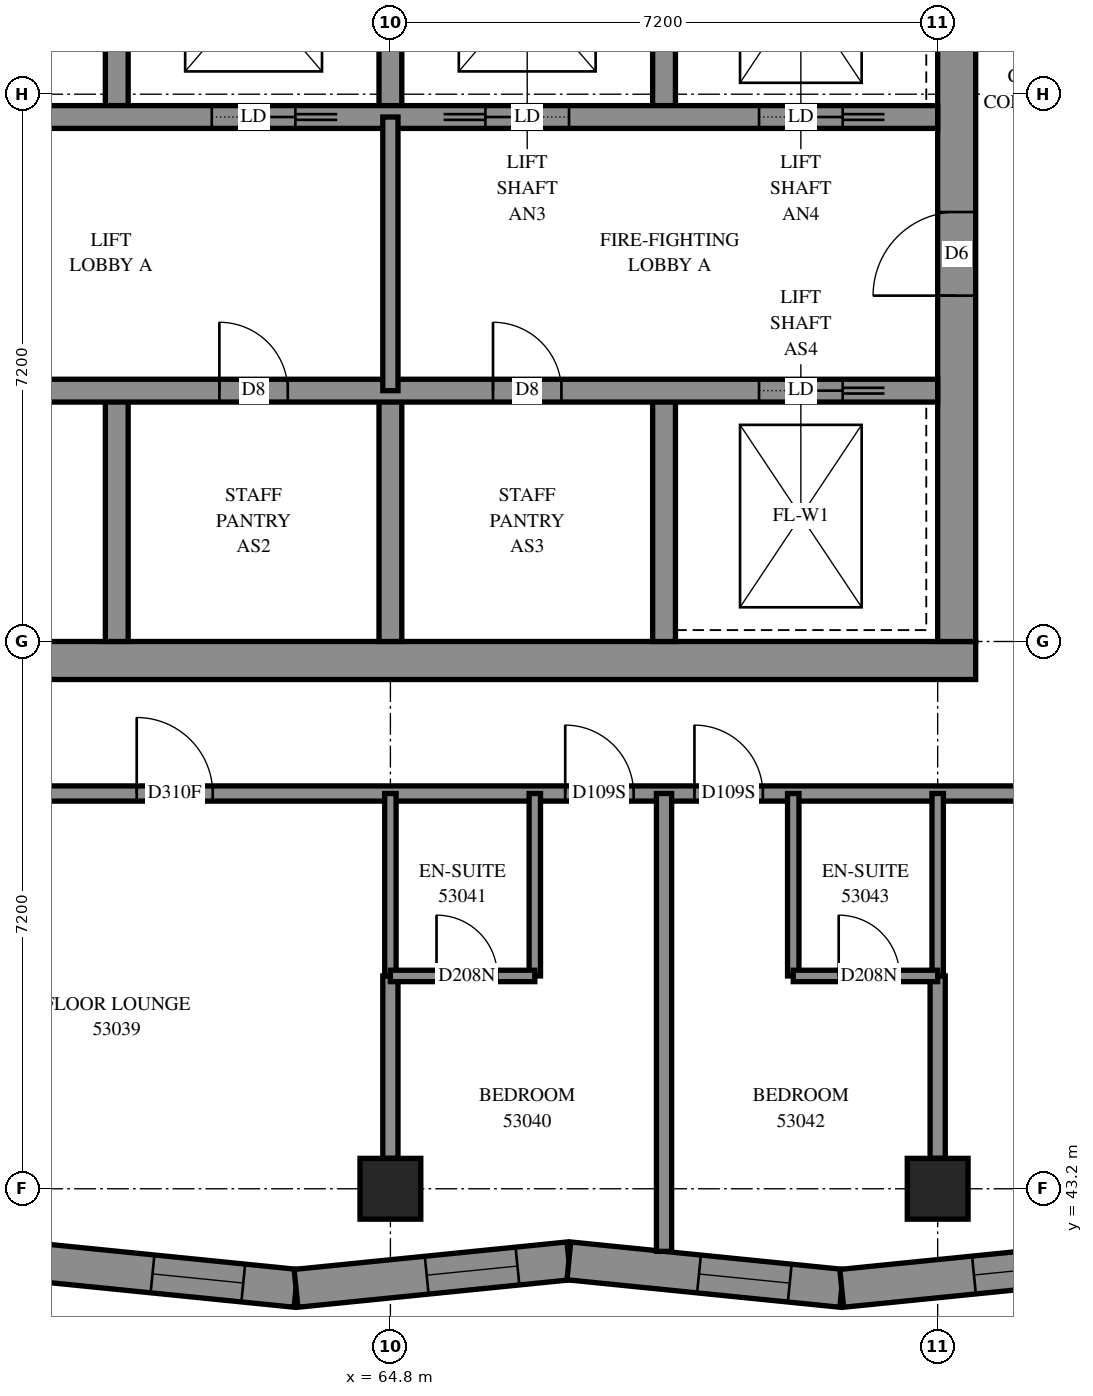
"""IFC4 building model, lengths in metres.
Left out: names, types, materials, properties, quantities, classifications, styles, units other than length and angle.
Written with IfcOpenShell. Run it as: python <this file> out.ifc"""

import sys

from ifc_helpers import new_model, si_unit, direction, frame, frame_2d, origin, origin_2d, place, context, subcontext, project, spatial, polyline, rectangle, outline, extrude, element, fill, save


model = new_model("IFC4")
c1 = context("Model", 3, precision=1e-05, world=origin(), true_north=direction((0.0, 1.0)))
c2 = subcontext(c1, "Body", "Model", "MODEL_VIEW")
j1 = project(units=[si_unit("LENGTHUNIT", "METRE"), si_unit("PLANEANGLEUNIT", "RADIAN")], contexts=[c1])
p1 = place(None, origin())
s1 = spatial("IfcSite", under=j1, at=p1, CompositionType="ELEMENT")
p2 = place(p1, origin())
s2 = spatial("IfcBuilding", under=s1, at=p2, CompositionType="ELEMENT")
p3 = place(p2, frame((0.0, 0.0, 196.4)))
s3 = spatial("IfcBuildingStorey", under=s2, at=p3, CompositionType="ELEMENT", Elevation=196.4)
for number, where, z_axis, x_axis in (
    (1, (64.8, 43.2, 0.0), (0.0, 0.0, 1.0), (1.0, 0.0, 0.0)),
    (2, (72.0, 43.2, 0.0), (0.0, 0.0, 1.0), (1.0, 0.0, 0.0)),
):
    element("IfcColumn", number, at=place(p3, frame(where, z_axis=z_axis, x_axis=x_axis)), inside=s3, PredefinedType="COLUMN", context=c2, shape_type="SweptSolid", body=[
        extrude(rectangle(XDim=0.8, YDim=0.8, at=origin_2d()), origin(), (0.0, 0.0, 1.0), 3.1),
    ])
p4 = place(p3, frame((57.1, 50.15, -0.3), z_axis=(0.0, 0.0, 1.0), x_axis=(1.0, 0.0, 0.0)))
e3 = element("IfcWall", 3, at=p4, inside=s3, PredefinedType="SHEAR", context=c2, shape_type="SweptSolid", body=[
    extrude(rectangle(XDim=15.4, YDim=0.5, at=frame_2d((7.7, 0.0))), origin(), (0.0, 0.0, 1.0), 2.7),
])
p5 = place(p3, frame((72.25, 50.4, -0.3), z_axis=(0.0, 0.0, 1.0), x_axis=(0.0, 1.0, 0.0)))
e4 = element("IfcWall", 4, at=p5, inside=s3, PredefinedType="SHEAR", context=c2, shape_type="SweptSolid", body=[
    extrude(rectangle(XDim=14.4, YDim=0.5, at=frame_2d((7.2, 0.0))), origin(), (0.0, 0.0, 1.0), 2.7),
])
p6 = place(p5, frame((4.55, 0.0, 0.3)))
e5 = element("IfcOpeningElement", 5, at=p6, cuts=e4, PredefinedType="OPENING", context=c2, shape_type="SweptSolid", body=[
    extrude(rectangle(XDim=1.1, YDim=2.1, at=frame_2d((0.55, 1.05))), frame((0.0, 0.26, 0.0), z_axis=(0.0, -1.0, 0.0), x_axis=(1.0, 0.0, 0.0)), (0.0, 0.0, 1.0), 0.52),
])
p7 = place(p5, frame((11.35, 0.0, 0.3)))
e6 = element("IfcOpeningElement", 6, at=p7, cuts=e4, PredefinedType="OPENING", context=c2, shape_type="SweptSolid", body=[
    extrude(rectangle(XDim=1.1, YDim=2.1, at=frame_2d((0.55, 1.05))), frame((0.0, 0.26, 0.0), z_axis=(0.0, -1.0, 0.0), x_axis=(1.0, 0.0, 0.0)), (0.0, 0.0, 1.0), 0.52),
])
for number, where, z_axis, x_axis in (
    (7, (61.2, 50.4, 0.0), (0.0, 0.0, 1.0), (0.0, 1.0, 0.0)),
    (8, (61.2, 57.3, 0.0), (0.0, 0.0, 1.0), (0.0, 1.0, 0.0)),
    (9, (64.8, 50.4, 0.0), (0.0, 0.0, 1.0), (0.0, 1.0, 0.0)),
    (10, (64.8, 57.3, 0.0), (0.0, 0.0, 1.0), (0.0, 1.0, 0.0)),
    (11, (68.4, 50.4, 0.0), (0.0, 0.0, 1.0), (0.0, 1.0, 0.0)),
    (12, (68.4, 57.3, 0.0), (0.0, 0.0, 1.0), (0.0, 1.0, 0.0)),
):
    element("IfcWall", number, at=place(p3, frame(where, z_axis=z_axis, x_axis=x_axis)), inside=s3, PredefinedType="SOLIDWALL", context=c2, shape_type="SweptSolid", body=[
        extrude(rectangle(XDim=3.3, YDim=0.3, at=frame_2d((1.65, 0.0))), origin(), (0.0, 0.0, 1.0), 3.1),
    ])
p8 = place(p3, frame((57.6, 53.7, 0.0), z_axis=(0.0, 0.0, 1.0), x_axis=(1.0, 0.0, 0.0)))
e13 = element("IfcWall", 13, at=p8, inside=s3, PredefinedType="SOLIDWALL", context=c2, shape_type="SweptSolid", body=[
    extrude(rectangle(XDim=14.4, YDim=0.3, at=frame_2d((7.2, 0.0))), origin(), (0.0, 0.0, 1.0), 3.1),
])
p9 = place(p8, frame((1.35, 0.0, 0.0)))
e14 = element("IfcOpeningElement", 14, at=p9, cuts=e13, PredefinedType="OPENING", context=c2, shape_type="SweptSolid", body=[
    extrude(rectangle(XDim=0.9, YDim=2.1, at=frame_2d((0.45, 1.05))), frame((0.0, 0.16, 0.0), z_axis=(0.0, -1.0, 0.0), x_axis=(1.0, 0.0, 0.0)), (0.0, 0.0, 1.0), 0.32),
])
p10 = place(p8, frame((4.95, 0.0, 0.0)))
e15 = element("IfcOpeningElement", 15, at=p10, cuts=e13, PredefinedType="OPENING", context=c2, shape_type="SweptSolid", body=[
    extrude(rectangle(XDim=0.9, YDim=2.1, at=frame_2d((0.45, 1.05))), frame((0.0, 0.16, 0.0), z_axis=(0.0, -1.0, 0.0), x_axis=(1.0, 0.0, 0.0)), (0.0, 0.0, 1.0), 0.32),
])
p11 = place(p8, frame((8.55, 0.0, 0.0)))
e16 = element("IfcOpeningElement", 16, at=p11, cuts=e13, PredefinedType="OPENING", context=c2, shape_type="SweptSolid", body=[
    extrude(rectangle(XDim=0.9, YDim=2.1, at=frame_2d((0.45, 1.05))), frame((0.0, 0.16, 0.0), z_axis=(0.0, -1.0, 0.0), x_axis=(1.0, 0.0, 0.0)), (0.0, 0.0, 1.0), 0.32),
])
p12 = place(p8, frame((12.05, 0.0, 0.0)))
e17 = element("IfcOpeningElement", 17, at=p12, cuts=e13, PredefinedType="OPENING", context=c2, shape_type="SweptSolid", body=[
    extrude(rectangle(XDim=1.1, YDim=2.1, at=frame_2d((0.55, 1.05))), frame((0.0, 0.16, 0.0), z_axis=(0.0, -1.0, 0.0), x_axis=(1.0, 0.0, 0.0)), (0.0, 0.0, 1.0), 0.32),
])
p13 = place(p3, frame((57.6, 57.3, 0.0), z_axis=(0.0, 0.0, 1.0), x_axis=(1.0, 0.0, 0.0)))
e18 = element("IfcWall", 18, at=p13, inside=s3, PredefinedType="SOLIDWALL", context=c2, shape_type="SweptSolid", body=[
    extrude(rectangle(XDim=14.4, YDim=0.3, at=frame_2d((7.2, 0.0))), origin(), (0.0, 0.0, 1.0), 3.1),
])
p14 = place(p13, frame((1.25, 0.0, 0.0)))
e19 = element("IfcOpeningElement", 19, at=p14, cuts=e18, PredefinedType="OPENING", context=c2, shape_type="SweptSolid", body=[
    extrude(rectangle(XDim=1.1, YDim=2.1, at=frame_2d((0.55, 1.05))), frame((0.0, 0.16, 0.0), z_axis=(0.0, -1.0, 0.0), x_axis=(1.0, 0.0, 0.0)), (0.0, 0.0, 1.0), 0.32),
])
p15 = place(p13, frame((4.85, 0.0, 0.0)))
e20 = element("IfcOpeningElement", 20, at=p15, cuts=e18, PredefinedType="OPENING", context=c2, shape_type="SweptSolid", body=[
    extrude(rectangle(XDim=1.1, YDim=2.1, at=frame_2d((0.55, 1.05))), frame((0.0, 0.16, 0.0), z_axis=(0.0, -1.0, 0.0), x_axis=(1.0, 0.0, 0.0)), (0.0, 0.0, 1.0), 0.32),
])
p16 = place(p13, frame((8.45, 0.0, 0.0)))
e21 = element("IfcOpeningElement", 21, at=p16, cuts=e18, PredefinedType="OPENING", context=c2, shape_type="SweptSolid", body=[
    extrude(rectangle(XDim=1.1, YDim=2.1, at=frame_2d((0.55, 1.05))), frame((0.0, 0.16, 0.0), z_axis=(0.0, -1.0, 0.0), x_axis=(1.0, 0.0, 0.0)), (0.0, 0.0, 1.0), 0.32),
])
p17 = place(p13, frame((12.05, 0.0, 0.0)))
e22 = element("IfcOpeningElement", 22, at=p17, cuts=e18, PredefinedType="OPENING", context=c2, shape_type="SweptSolid", body=[
    extrude(rectangle(XDim=1.1, YDim=2.1, at=frame_2d((0.55, 1.05))), frame((0.0, 0.16, 0.0), z_axis=(0.0, -1.0, 0.0), x_axis=(1.0, 0.0, 0.0)), (0.0, 0.0, 1.0), 0.32),
])
p18 = place(p3, frame((59.969, 42.251, 0.0), z_axis=(0.0, 0.0, 1.0), x_axis=(0.9949813245, -0.1000608012, 0.0)))
e23 = element("IfcWall", 23, at=p18, inside=s3, PredefinedType="SOLIDWALL", context=c2, shape_type="SweptSolid", body=[
    extrude(outline(polyline([(0.025, -0.25), (3.633, -0.25), (3.583, 0.25), (-0.025, 0.25), (0.025, -0.25)])), origin(), (0.0, 0.0, 1.0), 3.1),
])
p19 = place(p18, frame((1.71, 0.0, 0.45)))
e24 = element("IfcOpeningElement", 24, at=p19, cuts=e23, PredefinedType="OPENING", context=c2, shape_type="SweptSolid", body=[
    extrude(rectangle(XDim=1.2, YDim=2.5, at=frame_2d((0.6, 1.25))), frame((0.0, 0.26, 0.0), z_axis=(0.0, -1.0, 0.0), x_axis=(1.0, 0.0, 0.0)), (0.0, 0.0, 1.0), 0.52),
])
p20 = place(p3, frame((63.559, 41.89, 0.0), z_axis=(0.0, 0.0, 1.0), x_axis=(0.994981047, 0.1000635608, 0.0)))
e25 = element("IfcWall", 25, at=p20, inside=s3, PredefinedType="SOLIDWALL", context=c2, shape_type="SweptSolid", body=[
    extrude(outline(polyline([(-0.025, -0.25), (3.583, -0.25), (3.633, 0.25), (0.025, 0.25), (-0.025, -0.25)])), origin(), (0.0, 0.0, 1.0), 3.1),
])
p21 = place(p20, frame((1.728, 0.0, 0.45)))
e26 = element("IfcOpeningElement", 26, at=p21, cuts=e25, PredefinedType="OPENING", context=c2, shape_type="SweptSolid", body=[
    extrude(rectangle(XDim=1.2, YDim=2.5, at=frame_2d((0.6, 1.25))), frame((0.0, 0.26, 0.0), z_axis=(0.0, -1.0, 0.0), x_axis=(1.0, 0.0, 0.0)), (0.0, 0.0, 1.0), 0.52),
])
p22 = place(p3, frame((67.148, 42.251, 0.0), z_axis=(0.0, 0.0, 1.0), x_axis=(0.994981047, -0.1000635608, 0.0)))
e27 = element("IfcWall", 27, at=p22, inside=s3, PredefinedType="SOLIDWALL", context=c2, shape_type="SweptSolid", body=[
    extrude(outline(polyline([(0.025, -0.25), (3.633, -0.25), (3.583, 0.25), (-0.025, 0.25), (0.025, -0.25)])), origin(), (0.0, 0.0, 1.0), 3.1),
])
p23 = place(p22, frame((1.72, 0.0, 0.45)))
e28 = element("IfcOpeningElement", 28, at=p23, cuts=e27, PredefinedType="OPENING", context=c2, shape_type="SweptSolid", body=[
    extrude(rectangle(XDim=1.2, YDim=2.5, at=frame_2d((0.6, 1.25))), frame((0.0, 0.26, 0.0), z_axis=(0.0, -1.0, 0.0), x_axis=(1.0, 0.0, 0.0)), (0.0, 0.0, 1.0), 0.52),
])
p24 = place(p3, frame((70.738, 41.89, 0.0), z_axis=(0.0, 0.0, 1.0), x_axis=(0.9949827385, 0.1000467394, 0.0)))
e29 = element("IfcWall", 29, at=p24, inside=s3, PredefinedType="SOLIDWALL", context=c2, shape_type="SweptSolid", body=[
    extrude(outline(polyline([(-0.025, -0.25), (3.583, -0.25), (3.674, 0.25), (0.025, 0.25), (-0.025, -0.25)])), origin(), (0.0, 0.0, 1.0), 3.1),
])
p25 = place(p24, frame((1.748, 0.0, 0.45)))
e30 = element("IfcOpeningElement", 30, at=p25, cuts=e29, PredefinedType="OPENING", context=c2, shape_type="SweptSolid", body=[
    extrude(rectangle(XDim=1.2, YDim=2.5, at=frame_2d((0.6, 1.25))), frame((0.0, 0.26, 0.0), z_axis=(0.0, -1.0, 0.0), x_axis=(1.0, 0.0, 0.0)), (0.0, 0.0, 1.0), 0.52),
])
p26 = place(p3, frame((64.8, 53.7, 0.0), z_axis=(0.0, 0.0, 1.0), x_axis=(0.0, 1.0, 0.0)))
e31 = element("IfcWall", 31, at=p26, inside=s3, PredefinedType="PARTITIONING", context=c2, shape_type="SweptSolid", body=[
    extrude(rectangle(XDim=3.6, YDim=0.2, at=frame_2d((1.8, 0.0))), origin(), (0.0, 0.0, 1.0), 3.1),
])
p27 = place(p3, frame((55.6, 48.4, 0.0), z_axis=(0.0, 0.0, 1.0), x_axis=(1.0, 0.0, 0.0)))
e32 = element("IfcWall", 32, at=p27, inside=s3, PredefinedType="PARTITIONING", context=c2, shape_type="SweptSolid", body=[
    extrude(rectangle(XDim=18.4, YDim=0.2, at=frame_2d((9.2, 0.0))), origin(), (0.0, 0.0, 1.0), 3.1),
])
p28 = place(p27, frame((5.862, 0.0, 0.0)))
e33 = element("IfcOpeningElement", 33, at=p28, cuts=e32, PredefinedType="OPENING", context=c2, shape_type="SweptSolid", body=[
    extrude(rectangle(XDim=1.0, YDim=2.1, at=frame_2d((0.5, 1.05))), frame((0.0, 0.11, 0.0), z_axis=(0.0, -1.0, 0.0), x_axis=(1.0, 0.0, 0.0)), (0.0, 0.0, 1.0), 0.22),
])
p29 = place(p27, frame((11.5, 0.0, 0.0)))
e34 = element("IfcOpeningElement", 34, at=p29, cuts=e32, PredefinedType="OPENING", context=c2, shape_type="SweptSolid", body=[
    extrude(rectangle(XDim=0.9, YDim=2.1, at=frame_2d((0.45, 1.05))), frame((0.0, 0.11, 0.0), z_axis=(0.0, -1.0, 0.0), x_axis=(1.0, 0.0, 0.0)), (0.0, 0.0, 1.0), 0.22),
])
p30 = place(p27, frame((13.2, 0.0, 0.0)))
e35 = element("IfcOpeningElement", 35, at=p30, cuts=e32, PredefinedType="OPENING", context=c2, shape_type="SweptSolid", body=[
    extrude(rectangle(XDim=0.9, YDim=2.1, at=frame_2d((0.45, 1.05))), frame((0.0, 0.11, 0.0), z_axis=(0.0, -1.0, 0.0), x_axis=(1.0, 0.0, 0.0)), (0.0, 0.0, 1.0), 0.22),
])
p31 = place(p3, frame((68.4, 42.377, 0.0), z_axis=(0.0, 0.0, 1.0), x_axis=(0.0, 1.0, 0.0)))
e36 = element("IfcWall", 36, at=p31, inside=s3, PredefinedType="PARTITIONING", context=c2, shape_type="SweptSolid", body=[
    extrude(rectangle(XDim=6.023, YDim=0.2, at=frame_2d((3.012, 0.0))), origin(), (0.0, 0.0, 1.0), 3.1),
])
p32 = place(p3, frame((64.8, 43.6, 0.0), z_axis=(0.0, 0.0, 1.0), x_axis=(0.0, 1.0, 0.0)))
e37 = element("IfcWall", 37, at=p32, inside=s3, PredefinedType="PARTITIONING", context=c2, shape_type="SweptSolid", body=[
    extrude(rectangle(XDim=2.4, YDim=0.2, at=frame_2d((1.2, 0.0))), origin(), (0.0, 0.0, 1.0), 3.1),
])
for number, where, z_axis, x_axis in (
    (38, (66.7, 46.0, 0.0), (0.0, 0.0, 1.0), (0.0, 1.0, 0.0)),
    (39, (64.8, 46.0, 0.0), (0.0, 0.0, 1.0), (0.0, 1.0, 0.0)),
    (40, (70.1, 46.0, 0.0), (0.0, 0.0, 1.0), (0.0, 1.0, 0.0)),
):
    element("IfcWall", number, at=place(p3, frame(where, z_axis=z_axis, x_axis=x_axis)), inside=s3, PredefinedType="PARTITIONING", context=c2, shape_type="SweptSolid", body=[
        extrude(rectangle(XDim=2.4, YDim=0.15, at=frame_2d((1.2, 0.0))), origin(), (0.0, 0.0, 1.0), 3.1),
    ])
p33 = place(p3, frame((72.0, 43.6, 0.0), z_axis=(0.0, 0.0, 1.0), x_axis=(0.0, 1.0, 0.0)))
e41 = element("IfcWall", 41, at=p33, inside=s3, PredefinedType="PARTITIONING", context=c2, shape_type="SweptSolid", body=[
    extrude(rectangle(XDim=2.4, YDim=0.2, at=frame_2d((1.2, 0.0))), origin(), (0.0, 0.0, 1.0), 3.1),
])
p34 = place(p3, frame((72.0, 46.0, 0.0), z_axis=(0.0, 0.0, 1.0), x_axis=(0.0, 1.0, 0.0)))
e42 = element("IfcWall", 42, at=p34, inside=s3, PredefinedType="PARTITIONING", context=c2, shape_type="SweptSolid", body=[
    extrude(rectangle(XDim=2.4, YDim=0.15, at=frame_2d((1.2, 0.0))), origin(), (0.0, 0.0, 1.0), 3.1),
])
p35 = place(p3, frame((64.8, 46.0, 0.0), z_axis=(0.0, 0.0, 1.0), x_axis=(1.0, 0.0, 0.0)))
e43 = element("IfcWall", 43, at=p35, inside=s3, PredefinedType="PARTITIONING", context=c2, shape_type="SweptSolid", body=[
    extrude(rectangle(XDim=1.9, YDim=0.15, at=frame_2d((0.95, 0.0))), origin(), (0.0, 0.0, 1.0), 3.1),
])
p36 = place(p35, frame((0.607, 0.0, 0.0)))
e44 = element("IfcOpeningElement", 44, at=p36, cuts=e43, PredefinedType="OPENING", context=c2, shape_type="SweptSolid", body=[
    extrude(rectangle(XDim=0.8, YDim=2.1, at=frame_2d((0.4, 1.05))), frame((0.0, 0.085, 0.0), z_axis=(0.0, -1.0, 0.0), x_axis=(1.0, 0.0, 0.0)), (0.0, 0.0, 1.0), 0.17),
])
p37 = place(p3, frame((70.1, 46.0, 0.0), z_axis=(0.0, 0.0, 1.0), x_axis=(1.0, 0.0, 0.0)))
e45 = element("IfcWall", 45, at=p37, inside=s3, PredefinedType="PARTITIONING", context=c2, shape_type="SweptSolid", body=[
    extrude(rectangle(XDim=1.9, YDim=0.15, at=frame_2d((0.95, 0.0))), origin(), (0.0, 0.0, 1.0), 3.1),
])
p38 = place(p37, frame((0.598, 0.0, 0.0)))
e46 = element("IfcOpeningElement", 46, at=p38, cuts=e45, PredefinedType="OPENING", context=c2, shape_type="SweptSolid", body=[
    extrude(rectangle(XDim=0.8, YDim=2.1, at=frame_2d((0.4, 1.05))), frame((0.0, 0.085, 0.0), z_axis=(0.0, -1.0, 0.0), x_axis=(1.0, 0.0, 0.0)), (0.0, 0.0, 1.0), 0.17),
])
p39 = place(p19, origin())
e47 = element("IfcWindow", 47, at=p39, inside=s3, PartitioningType="SINGLE_PANEL", PredefinedType="WINDOW", context=c2, shape_type="SweptSolid", body=[
    extrude(rectangle(XDim=1.2, YDim=2.5, at=frame_2d((0.6, 1.25))), frame((0.0, 0.18, 0.0), z_axis=(0.0, -1.0, 0.0), x_axis=(1.0, 0.0, 0.0)), (0.0, 0.0, 1.0), 0.06),
])
fill(e24, e47)
p40 = place(p21, origin())
e48 = element("IfcWindow", 48, at=p40, inside=s3, PartitioningType="SINGLE_PANEL", PredefinedType="WINDOW", context=c2, shape_type="SweptSolid", body=[
    extrude(rectangle(XDim=1.2, YDim=2.5, at=frame_2d((0.6, 1.25))), frame((0.0, 0.18, 0.0), z_axis=(0.0, -1.0, 0.0), x_axis=(1.0, 0.0, 0.0)), (0.0, 0.0, 1.0), 0.06),
])
fill(e26, e48)
p41 = place(p23, origin())
e49 = element("IfcWindow", 49, at=p41, inside=s3, PartitioningType="SINGLE_PANEL", PredefinedType="WINDOW", context=c2, shape_type="SweptSolid", body=[
    extrude(rectangle(XDim=1.2, YDim=2.5, at=frame_2d((0.6, 1.25))), frame((0.0, 0.18, 0.0), z_axis=(0.0, -1.0, 0.0), x_axis=(1.0, 0.0, 0.0)), (0.0, 0.0, 1.0), 0.06),
])
fill(e28, e49)
p42 = place(p25, origin())
e50 = element("IfcWindow", 50, at=p42, inside=s3, PartitioningType="SINGLE_PANEL", PredefinedType="WINDOW", context=c2, shape_type="SweptSolid", body=[
    extrude(rectangle(XDim=1.2, YDim=2.5, at=frame_2d((0.6, 1.25))), frame((0.0, 0.18, 0.0), z_axis=(0.0, -1.0, 0.0), x_axis=(1.0, 0.0, 0.0)), (0.0, 0.0, 1.0), 0.06),
])
fill(e30, e50)
p43 = place(p6, origin())
e51 = element("IfcDoor", 51, at=p43, inside=s3, OperationType="DOUBLE_DOOR_SINGLE_SWING", PredefinedType="DOOR", context=c2, shape_type="SweptSolid", body=[
    extrude(rectangle(XDim=1.1, YDim=2.1, at=frame_2d((0.55, 1.05))), frame((0.0, 0.025, 0.0), z_axis=(0.0, -1.0, 0.0), x_axis=(1.0, 0.0, 0.0)), (0.0, 0.0, 1.0), 0.05),
])
fill(e5, e51)
p44 = place(p10, origin())
e52 = element("IfcDoor", 52, at=p44, inside=s3, OperationType="SINGLE_SWING_LEFT", PredefinedType="DOOR", context=c2, shape_type="SweptSolid", body=[
    extrude(rectangle(XDim=0.9, YDim=2.1, at=frame_2d((0.45, 1.05))), frame((0.0, 0.025, 0.0), z_axis=(0.0, -1.0, 0.0), x_axis=(1.0, 0.0, 0.0)), (0.0, 0.0, 1.0), 0.05),
])
fill(e15, e52)
p45 = place(p11, origin())
e53 = element("IfcDoor", 53, at=p45, inside=s3, OperationType="SINGLE_SWING_LEFT", PredefinedType="DOOR", context=c2, shape_type="SweptSolid", body=[
    extrude(rectangle(XDim=0.9, YDim=2.1, at=frame_2d((0.45, 1.05))), frame((0.0, 0.025, 0.0), z_axis=(0.0, -1.0, 0.0), x_axis=(1.0, 0.0, 0.0)), (0.0, 0.0, 1.0), 0.05),
])
fill(e16, e53)
p46 = place(p12, origin())
e54 = element("IfcDoor", 54, at=p46, inside=s3, OperationType="SLIDING_TO_RIGHT", PredefinedType="DOOR", context=c2, shape_type="SweptSolid", body=[
    extrude(rectangle(XDim=1.1, YDim=2.1, at=frame_2d((0.55, 1.05))), frame((0.0, 0.025, 0.0), z_axis=(0.0, -1.0, 0.0), x_axis=(1.0, 0.0, 0.0)), (0.0, 0.0, 1.0), 0.05),
])
fill(e17, e54)
p47 = place(p15, origin())
e55 = element("IfcDoor", 55, at=p47, inside=s3, OperationType="SLIDING_TO_RIGHT", PredefinedType="DOOR", context=c2, shape_type="SweptSolid", body=[
    extrude(rectangle(XDim=1.1, YDim=2.1, at=frame_2d((0.55, 1.05))), frame((0.0, 0.025, 0.0), z_axis=(0.0, -1.0, 0.0), x_axis=(1.0, 0.0, 0.0)), (0.0, 0.0, 1.0), 0.05),
])
fill(e20, e55)
p48 = place(p16, origin())
e56 = element("IfcDoor", 56, at=p48, inside=s3, OperationType="SLIDING_TO_LEFT", PredefinedType="DOOR", context=c2, shape_type="SweptSolid", body=[
    extrude(rectangle(XDim=1.1, YDim=2.1, at=frame_2d((0.55, 1.05))), frame((0.0, 0.025, 0.0), z_axis=(0.0, -1.0, 0.0), x_axis=(1.0, 0.0, 0.0)), (0.0, 0.0, 1.0), 0.05),
])
fill(e21, e56)
p49 = place(p17, origin())
e57 = element("IfcDoor", 57, at=p49, inside=s3, OperationType="SLIDING_TO_RIGHT", PredefinedType="DOOR", context=c2, shape_type="SweptSolid", body=[
    extrude(rectangle(XDim=1.1, YDim=2.1, at=frame_2d((0.55, 1.05))), frame((0.0, 0.025, 0.0), z_axis=(0.0, -1.0, 0.0), x_axis=(1.0, 0.0, 0.0)), (0.0, 0.0, 1.0), 0.05),
])
fill(e22, e57)
p50 = place(p28, origin())
e58 = element("IfcDoor", 58, at=p50, inside=s3, OperationType="SINGLE_SWING_LEFT", PredefinedType="DOOR", context=c2, shape_type="SweptSolid", body=[
    extrude(rectangle(XDim=1.0, YDim=2.1, at=frame_2d((0.5, 1.05))), frame((0.0, 0.025, 0.0), z_axis=(0.0, -1.0, 0.0), x_axis=(1.0, 0.0, 0.0)), (0.0, 0.0, 1.0), 0.05),
])
fill(e33, e58)
p51 = place(p29, origin())
e59 = element("IfcDoor", 59, at=p51, inside=s3, OperationType="SINGLE_SWING_LEFT", PredefinedType="DOOR", context=c2, shape_type="SweptSolid", body=[
    extrude(rectangle(XDim=0.9, YDim=2.1, at=frame_2d((0.45, 1.05))), frame((0.0, 0.025, 0.0), z_axis=(0.0, -1.0, 0.0), x_axis=(1.0, 0.0, 0.0)), (0.0, 0.0, 1.0), 0.05),
])
fill(e34, e59)
p52 = place(p36, origin())
e60 = element("IfcDoor", 60, at=p52, inside=s3, OperationType="SINGLE_SWING_RIGHT", PredefinedType="DOOR", context=c2, shape_type="SweptSolid", body=[
    extrude(rectangle(XDim=0.8, YDim=2.1, at=frame_2d((0.4, 1.05))), frame((0.0, 0.025, 0.0), z_axis=(0.0, -1.0, 0.0), x_axis=(1.0, 0.0, 0.0)), (0.0, 0.0, 1.0), 0.05),
])
fill(e44, e60)
p53 = place(p30, origin())
e61 = element("IfcDoor", 61, at=p53, inside=s3, OperationType="SINGLE_SWING_RIGHT", PredefinedType="DOOR", context=c2, shape_type="SweptSolid", body=[
    extrude(rectangle(XDim=0.9, YDim=2.1, at=frame_2d((0.45, 1.05))), frame((0.0, 0.025, 0.0), z_axis=(0.0, -1.0, 0.0), x_axis=(1.0, 0.0, 0.0)), (0.0, 0.0, 1.0), 0.05),
])
fill(e35, e61)
p54 = place(p38, origin())
e62 = element("IfcDoor", 62, at=p54, inside=s3, OperationType="SINGLE_SWING_RIGHT", PredefinedType="DOOR", context=c2, shape_type="SweptSolid", body=[
    extrude(rectangle(XDim=0.8, YDim=2.1, at=frame_2d((0.4, 1.05))), frame((0.0, 0.025, 0.0), z_axis=(0.0, -1.0, 0.0), x_axis=(1.0, 0.0, 0.0)), (0.0, 0.0, 1.0), 0.05),
])
fill(e46, e62)
save(model, sys.argv[1])
